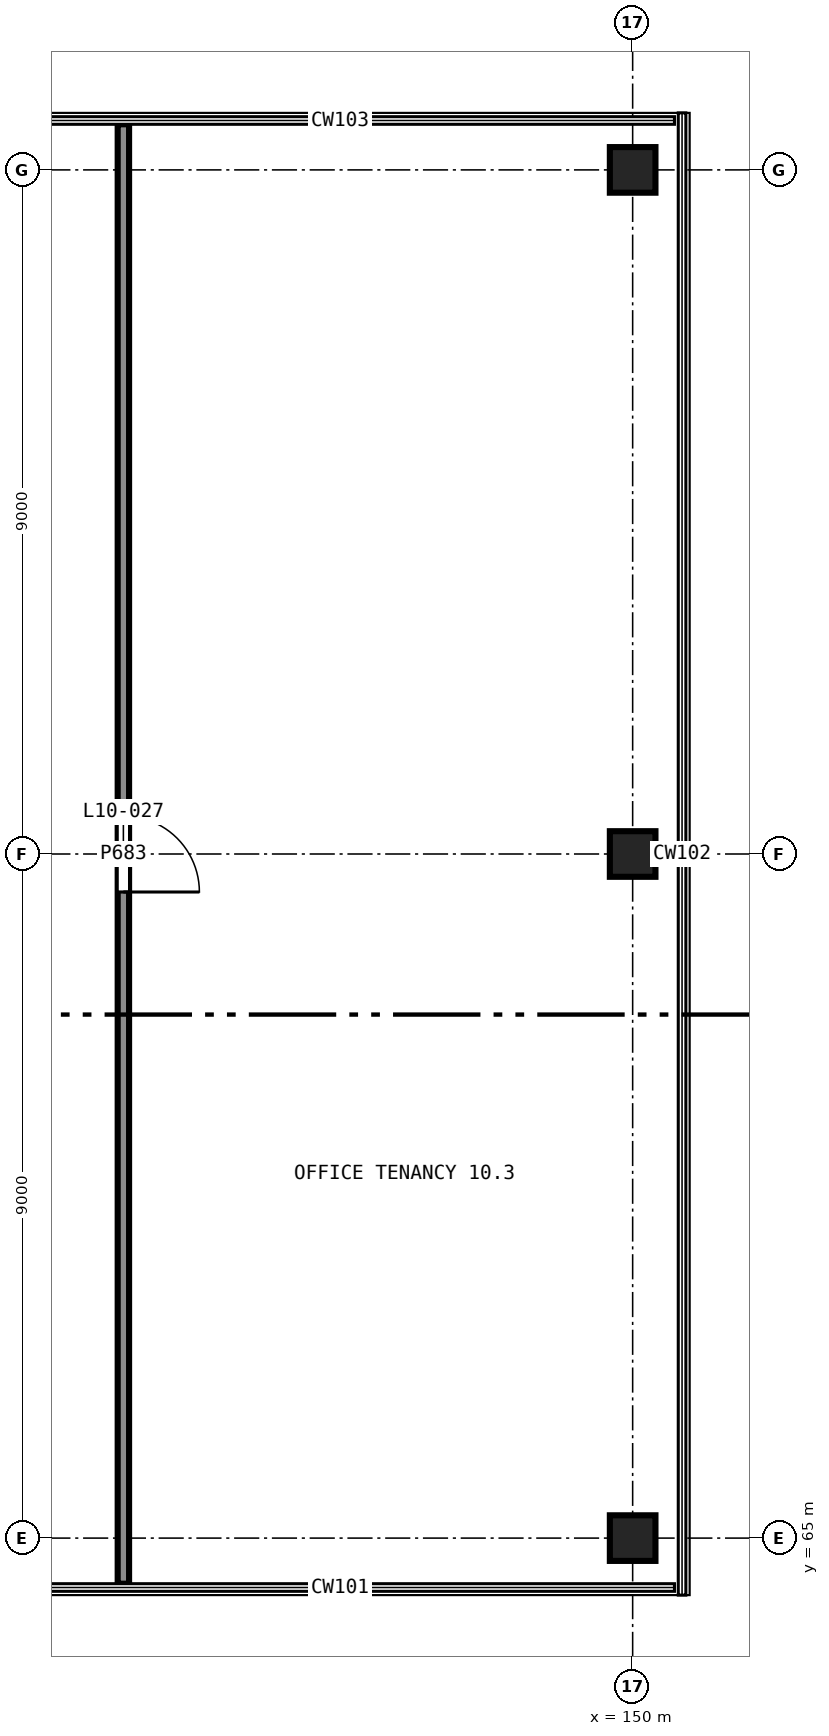
"""IFC4 building model, lengths in metres.
Left out: names, types, materials, properties, quantities, classifications, styles, units other than length and angle.
Written with IfcOpenShell. Run it as: python <this file> out.ifc"""

import sys

from ifc_helpers import new_model, si_unit, direction, frame, frame_2d, origin, origin_2d, place, context, subcontext, project, spatial, rectangle, extrude, element, fill, save


model = new_model("IFC4")
c1 = context("Model", 3, precision=1e-05, world=origin(), true_north=direction((0.0, 1.0)))
c2 = subcontext(c1, "Body", "Model", "MODEL_VIEW")
j1 = project(units=[si_unit("LENGTHUNIT", "METRE"), si_unit("PLANEANGLEUNIT", "RADIAN")], contexts=[c1])
p1 = place(None, origin())
s1 = spatial("IfcSite", under=j1, at=p1, CompositionType="ELEMENT")
p2 = place(p1, origin())
s2 = spatial("IfcBuilding", under=s1, at=p2, CompositionType="ELEMENT")
p3 = place(p2, frame((0.0, 0.0, 41.5)))
s3 = spatial("IfcBuildingStorey", under=s2, at=p3, CompositionType="ELEMENT", Elevation=41.5)
for number, where, z_axis, x_axis in (
    (1, (150.0, 65.0, 0.0), (0.0, 0.0, 1.0), (1.0, 0.0, 0.0)),
    (2, (150.0, 74.0, 0.0), (0.0, 0.0, 1.0), (1.0, 0.0, 0.0)),
    (3, (150.0, 83.0, 0.0), (0.0, 0.0, 1.0), (1.0, 0.0, 0.0)),
):
    element("IfcColumn", number, at=place(p3, frame(where, z_axis=z_axis, x_axis=x_axis)), inside=s3, PredefinedType="COLUMN", context=c2, shape_type="SweptSolid", body=[
        extrude(rectangle(XDim=0.6, YDim=0.6, at=origin_2d()), origin(), (0.0, 0.0, 1.0), 4.0),
    ])
p4 = place(p3, frame((143.3, 83.6, 0.0), z_axis=(0.0, 0.0, 1.0), x_axis=(0.0, -1.0, 0.0)))
e4 = element("IfcWall", 4, at=p4, inside=s3, PredefinedType="PARTITIONING", context=c2, shape_type="SweptSolid", body=[
    extrude(rectangle(XDim=19.2, YDim=0.15, at=frame_2d((9.6, 0.0))), origin(), (0.0, 0.0, 1.0), 3.75),
])
p5 = place(p4, frame((9.1, 0.0, 0.0)))
e5 = element("IfcOpeningElement", 5, at=p5, cuts=e4, PredefinedType="OPENING", context=c2, shape_type="SweptSolid", body=[
    extrude(rectangle(XDim=1.0, YDim=2.1, at=frame_2d((0.5, 1.05))), frame((0.0, 0.085, 0.0), z_axis=(0.0, -1.0, 0.0), x_axis=(1.0, 0.0, 0.0)), (0.0, 0.0, 1.0), 0.17),
])
p6 = place(p5, origin())
e6 = element("IfcDoor", 6, at=p6, inside=s3, OperationType="SINGLE_SWING_LEFT", PredefinedType="DOOR", context=c2, shape_type="SweptSolid", body=[
    extrude(rectangle(XDim=1.0, YDim=2.1, at=frame_2d((0.5, 1.05))), frame((0.0, 0.025, 0.0), z_axis=(0.0, -1.0, 0.0), x_axis=(1.0, 0.0, 0.0)), (0.0, 0.0, 1.0), 0.05),
])
fill(e5, e6)
save(model, sys.argv[1])
